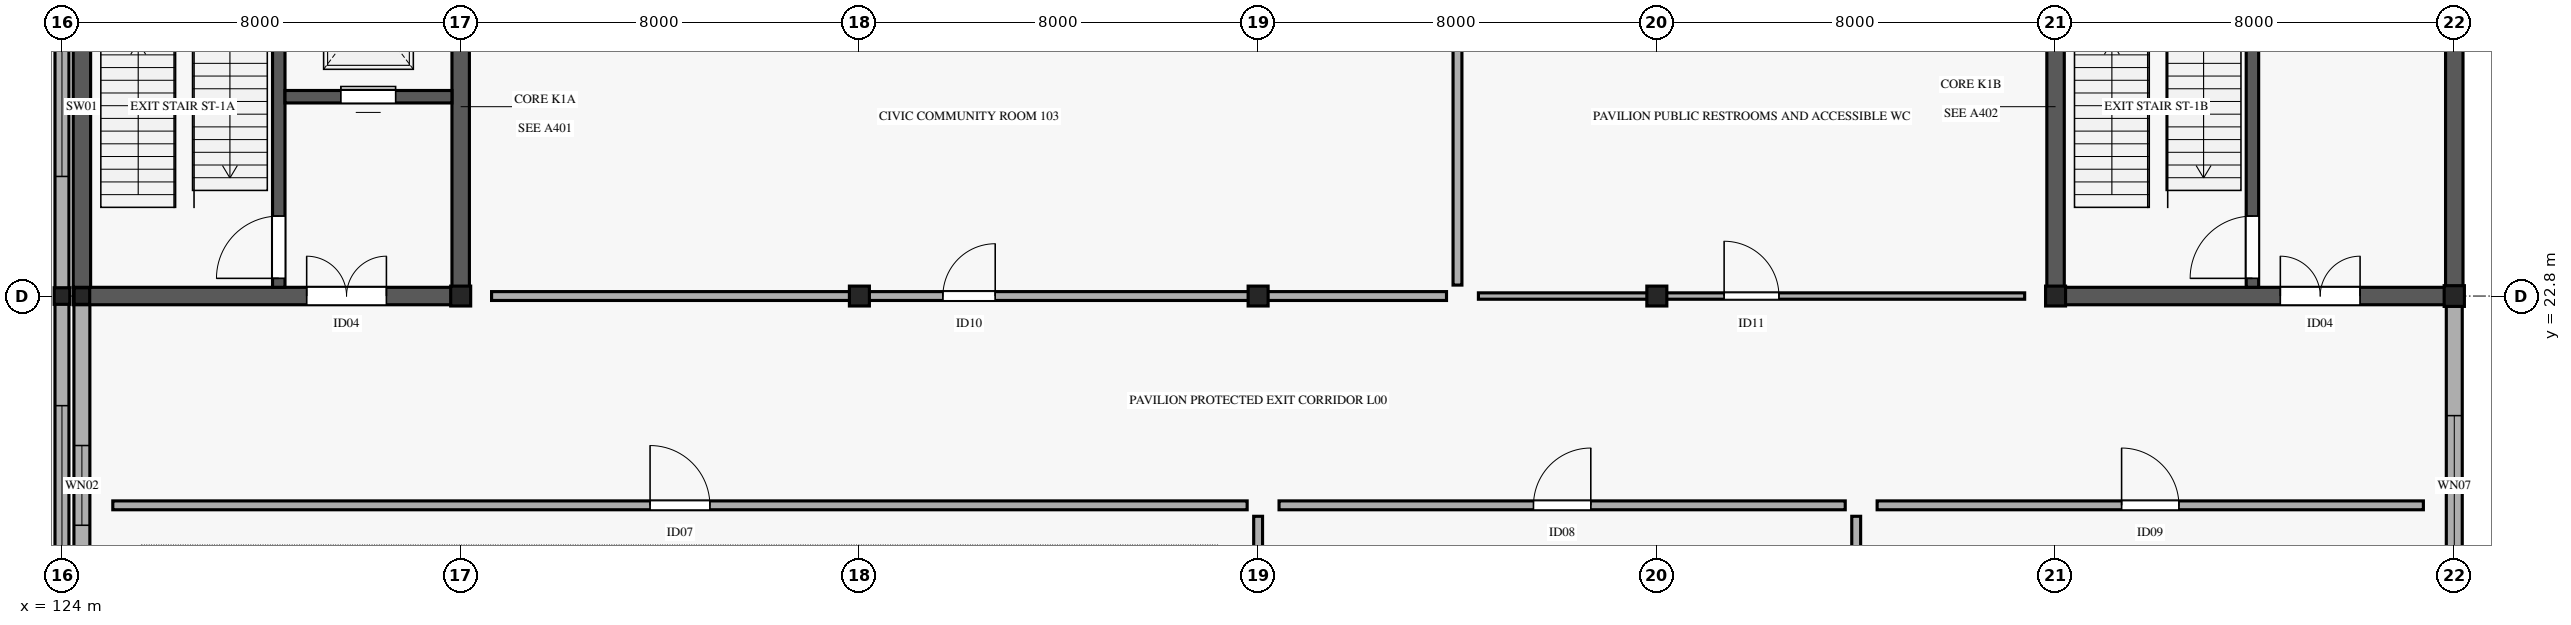
"""IFC4 building model, lengths in metres.
Left out: names, types, materials, properties, quantities, classifications, styles, units other than length and angle.
Written with IfcOpenShell. Run it as: python <this file> out.ifc"""

import sys

from ifc_helpers import new_model, si_unit, direction, frame, frame_2d, origin, origin_2d, place, context, subcontext, project, spatial, rectangle, i_section, extrude, element, fill, save


model = new_model("IFC4")
c1 = context("Model", 3, precision=1e-05, world=origin(), true_north=direction((0.0, 1.0)))
c2 = subcontext(c1, "Body", "Model", "MODEL_VIEW")
j1 = project(units=[si_unit("LENGTHUNIT", "METRE"), si_unit("PLANEANGLEUNIT", "RADIAN")], contexts=[c1])
p1 = place(None, origin())
s1 = spatial("IfcSite", under=j1, at=p1, CompositionType="ELEMENT")
p2 = place(p1, origin())
s2 = spatial("IfcBuilding", under=s1, at=p2, CompositionType="ELEMENT")
p3 = place(p2, origin())
s3 = spatial("IfcBuildingStorey", under=s2, at=p3, CompositionType="ELEMENT", Elevation=0.0)
p4 = place(p3, frame((124.4, 22.8, 0.0), z_axis=(0.0, 0.0, 1.0), x_axis=(1.0, 0.0, 0.0)))
e1 = element("IfcColumn", 1, at=p4, inside=s3, PredefinedType="COLUMN", context=c2, shape_type="SweptSolid", body=[
    extrude(i_section(OverallWidth=0.313, OverallDepth=0.333, WebThickness=0.018, FlangeThickness=0.028, FilletRadius=0.015, at=origin_2d()), origin(), (0.0, 0.0, 1.0), 5.185),
])
for number, where, z_axis, x_axis in (
    (2, (132.0, 22.8, 0.0), (0.0, 0.0, 1.0), (1.0, 0.0, 0.0)),
    (3, (140.0, 22.8, 0.0), (0.0, 0.0, 1.0), (1.0, 0.0, 0.0)),
    (4, (148.0, 22.8, 0.0), (0.0, 0.0, 1.0), (1.0, 0.0, 0.0)),
    (5, (156.0, 22.8, 0.0), (0.0, 0.0, 1.0), (1.0, 0.0, 0.0)),
    (6, (164.0, 22.8, 0.0), (0.0, 0.0, 1.0), (1.0, 0.0, 0.0)),
):
    element("IfcColumn", number, at=place(p3, frame(where, z_axis=z_axis, x_axis=x_axis)), inside=s3, PredefinedType="COLUMN", context=c2, shape_type="SweptSolid", body=[
        extrude(i_section(OverallWidth=0.401, OverallDepth=0.399, WebThickness=0.025, FlangeThickness=0.04, FilletRadius=0.015, at=origin_2d()), origin(), (0.0, 0.0, 1.0), 5.185),
    ])
p5 = place(p3, frame((172.0, 22.8, 0.0), z_axis=(0.0, 0.0, 1.0), x_axis=(1.0, 0.0, 0.0)))
e7 = element("IfcColumn", 7, at=p5, inside=s3, PredefinedType="COLUMN", context=c2, shape_type="SweptSolid", body=[
    extrude(i_section(OverallWidth=0.406, OverallDepth=0.416, WebThickness=0.03, FlangeThickness=0.048, FilletRadius=0.015, at=origin_2d()), origin(), (0.0, 0.0, 1.0), 5.185),
])
p6 = place(p3, frame((124.0, 22.8, 0.0), z_axis=(0.0, 0.0, 1.0), x_axis=(1.0, 0.0, 0.0)))
e8 = element("IfcColumn", 8, at=p6, inside=s3, PredefinedType="COLUMN", context=c2, shape_type="SweptSolid", body=[
    extrude(i_section(OverallWidth=0.313, OverallDepth=0.333, WebThickness=0.018, FlangeThickness=0.028, FilletRadius=0.015, at=origin_2d()), origin(), (0.0, 0.0, 1.0), 5.185),
])
p7 = place(p3, frame((124.4, 15.18, 0.0), z_axis=(0.0, 0.0, 1.0), x_axis=(0.0, 1.0, 0.0)))
e9 = element("IfcWall", 9, at=p7, inside=s3, PredefinedType="STANDARD", context=c2, shape_type="SweptSolid", body=[
    extrude(rectangle(XDim=7.64, YDim=0.32, at=frame_2d((3.82, 0.0))), origin(), (0.0, 0.0, 1.0), 4.25),
])
p8 = place(p7, frame((3.02, 0.0, 0.75)))
e10 = element("IfcOpeningElement", 10, at=p8, cuts=e9, PredefinedType="OPENING", context=c2, shape_type="SweptSolid", body=[
    extrude(rectangle(XDim=1.6, YDim=2.0, at=frame_2d((0.8, 1.0))), frame((0.0, 0.17, 0.0), z_axis=(0.0, -1.0, 0.0), x_axis=(1.0, 0.0, 0.0)), (0.0, 0.0, 1.0), 0.34),
])
p9 = place(p3, frame((172.0, 22.82, 0.0), z_axis=(0.0, 0.0, 1.0), x_axis=(0.0, -1.0, 0.0)))
e11 = element("IfcWall", 11, at=p9, inside=s3, PredefinedType="STANDARD", context=c2, shape_type="SweptSolid", body=[
    extrude(rectangle(XDim=7.64, YDim=0.32, at=frame_2d((3.82, 0.0))), origin(), (0.0, 0.0, 1.0), 4.25),
])
p10 = place(p9, frame((2.42, 0.0, 0.75)))
e12 = element("IfcOpeningElement", 12, at=p10, cuts=e11, PredefinedType="OPENING", context=c2, shape_type="SweptSolid", body=[
    extrude(rectangle(XDim=2.8, YDim=2.0, at=frame_2d((1.4, 1.0))), frame((0.0, 0.17, 0.0), z_axis=(0.0, -1.0, 0.0), x_axis=(1.0, 0.0, 0.0)), (0.0, 0.0, 1.0), 0.34),
])
p11 = place(p3, frame((124.0, 30.42, 0.0), z_axis=(0.0, 0.0, 1.0), x_axis=(0.0, -1.0, 0.0)))
e13 = element("IfcWall", 13, at=p11, inside=s3, PredefinedType="STANDARD", context=c2, shape_type="SweptSolid", body=[
    extrude(rectangle(XDim=7.64, YDim=0.28, at=frame_2d((3.82, 0.0))), origin(), (0.0, 0.0, 1.0), 4.25),
])
p12 = place(p11, frame((2.42, 0.0, 0.75)))
e14 = element("IfcOpeningElement", 14, at=p12, cuts=e13, PredefinedType="OPENING", context=c2, shape_type="SweptSolid", body=[
    extrude(rectangle(XDim=2.8, YDim=2.0, at=frame_2d((1.4, 1.0))), frame((0.0, 0.15, 0.0), z_axis=(0.0, -1.0, 0.0), x_axis=(1.0, 0.0, 0.0)), (0.0, 0.0, 1.0), 0.3),
])
p13 = place(p3, frame((124.0, 22.82, 0.0), z_axis=(0.0, 0.0, 1.0), x_axis=(0.0, -1.0, 0.0)))
e15 = element("IfcWall", 15, at=p13, inside=s3, PredefinedType="STANDARD", context=c2, shape_type="SweptSolid", body=[
    extrude(rectangle(XDim=7.64, YDim=0.28, at=frame_2d((3.82, 0.0))), origin(), (0.0, 0.0, 1.0), 4.25),
])
p14 = place(p13, frame((2.22, 0.0, 0.75)))
e16 = element("IfcOpeningElement", 16, at=p14, cuts=e15, PredefinedType="OPENING", context=c2, shape_type="SweptSolid", body=[
    extrude(rectangle(XDim=3.2, YDim=2.0, at=frame_2d((1.6, 1.0))), frame((0.0, 0.15, 0.0), z_axis=(0.0, -1.0, 0.0), x_axis=(1.0, 0.0, 0.0)), (0.0, 0.0, 1.0), 0.3),
])
p15 = place(p3, frame((124.225, 22.8, 0.0), z_axis=(0.0, 0.0, 1.0), x_axis=(1.0, 0.0, 0.0)))
e17 = element("IfcWall", 17, at=p15, inside=s3, PredefinedType="SHEAR", context=c2, shape_type="SweptSolid", body=[
    extrude(rectangle(XDim=7.95, YDim=0.35, at=frame_2d((3.975, 0.0))), origin(), (0.0, 0.0, 1.0), 5.19),
])
p16 = place(p15, frame((4.685, 0.0, 0.0)))
e18 = element("IfcOpeningElement", 18, at=p16, cuts=e17, PredefinedType="OPENING", context=c2, shape_type="SweptSolid", body=[
    extrude(rectangle(XDim=1.6, YDim=2.35, at=frame_2d((0.8, 1.175))), frame((0.0, 0.185, 0.0), z_axis=(0.0, -1.0, 0.0), x_axis=(1.0, 0.0, 0.0)), (0.0, 0.0, 1.0), 0.37),
])
for number, where, z_axis, x_axis in (
    (19, (124.4, 22.975, 0.0), (0.0, 0.0, 1.0), (0.0, 1.0, 0.0)),
    (20, (132.0, 22.975, 0.0), (0.0, 0.0, 1.0), (0.0, 1.0, 0.0)),
):
    element("IfcWall", number, at=place(p3, frame(where, z_axis=z_axis, x_axis=x_axis)), inside=s3, PredefinedType="SHEAR", context=c2, shape_type="SweptSolid", body=[
        extrude(rectangle(XDim=7.25, YDim=0.35, at=frame_2d((3.625, 0.0))), origin(), (0.0, 0.0, 1.0), 5.19),
    ])
p17 = place(p3, frame((128.35, 22.975, 0.0), z_axis=(0.0, 0.0, 1.0), x_axis=(0.0, 1.0, 0.0)))
e21 = element("IfcWall", 21, at=p17, inside=s3, PredefinedType="SHEAR", context=c2, shape_type="SweptSolid", body=[
    extrude(rectangle(XDim=7.25, YDim=0.25, at=frame_2d((3.625, 0.0))), origin(), (0.0, 0.0, 1.0), 5.19),
])
p18 = place(p17, frame((0.18, 0.0, 0.0)))
e22 = element("IfcOpeningElement", 22, at=p18, cuts=e21, PredefinedType="OPENING", context=c2, shape_type="SweptSolid", body=[
    extrude(rectangle(XDim=1.25, YDim=2.2, at=frame_2d((0.625, 1.1))), frame((0.0, 0.135, 0.0), z_axis=(0.0, -1.0, 0.0), x_axis=(1.0, 0.0, 0.0)), (0.0, 0.0, 1.0), 0.27),
])
p19 = place(p3, frame((128.475, 26.8, 0.0), z_axis=(0.0, 0.0, 1.0), x_axis=(1.0, 0.0, 0.0)))
e23 = element("IfcWall", 23, at=p19, inside=s3, PredefinedType="SHEAR", context=c2, shape_type="SweptSolid", body=[
    extrude(rectangle(XDim=3.35, YDim=0.25, at=frame_2d((1.675, 0.0))), origin(), (0.0, 0.0, 1.0), 5.19),
])
p20 = place(p19, frame((1.12, 0.0, 0.0)))
e24 = element("IfcOpeningElement", 24, at=p20, cuts=e23, PredefinedType="OPENING", context=c2, shape_type="SweptSolid", body=[
    extrude(rectangle(XDim=1.1, YDim=2.2, at=frame_2d((0.55, 1.1))), frame((0.0, 0.135, 0.0), z_axis=(0.0, -1.0, 0.0), x_axis=(1.0, 0.0, 0.0)), (0.0, 0.0, 1.0), 0.27),
])
p21 = place(p3, frame((163.825, 22.8, 0.0), z_axis=(0.0, 0.0, 1.0), x_axis=(1.0, 0.0, 0.0)))
e25 = element("IfcWall", 25, at=p21, inside=s3, PredefinedType="SHEAR", context=c2, shape_type="SweptSolid", body=[
    extrude(rectangle(XDim=8.35, YDim=0.35, at=frame_2d((4.175, 0.0))), origin(), (0.0, 0.0, 1.0), 5.19),
])
p22 = place(p21, frame((4.685, 0.0, 0.0)))
e26 = element("IfcOpeningElement", 26, at=p22, cuts=e25, PredefinedType="OPENING", context=c2, shape_type="SweptSolid", body=[
    extrude(rectangle(XDim=1.6, YDim=2.35, at=frame_2d((0.8, 1.175))), frame((0.0, 0.185, 0.0), z_axis=(0.0, -1.0, 0.0), x_axis=(1.0, 0.0, 0.0)), (0.0, 0.0, 1.0), 0.37),
])
for number, where, z_axis, x_axis in (
    (27, (164.0, 22.975, 0.0), (0.0, 0.0, 1.0), (0.0, 1.0, 0.0)),
    (28, (172.0, 22.975, 0.0), (0.0, 0.0, 1.0), (0.0, 1.0, 0.0)),
):
    element("IfcWall", number, at=place(p3, frame(where, z_axis=z_axis, x_axis=x_axis)), inside=s3, PredefinedType="SHEAR", context=c2, shape_type="SweptSolid", body=[
        extrude(rectangle(XDim=7.25, YDim=0.35, at=frame_2d((3.625, 0.0))), origin(), (0.0, 0.0, 1.0), 5.19),
    ])
p23 = place(p3, frame((167.95, 22.975, 0.0), z_axis=(0.0, 0.0, 1.0), x_axis=(0.0, 1.0, 0.0)))
e29 = element("IfcWall", 29, at=p23, inside=s3, PredefinedType="SHEAR", context=c2, shape_type="SweptSolid", body=[
    extrude(rectangle(XDim=7.25, YDim=0.25, at=frame_2d((3.625, 0.0))), origin(), (0.0, 0.0, 1.0), 5.19),
])
p24 = place(p23, frame((0.18, 0.0, 0.0)))
e30 = element("IfcOpeningElement", 30, at=p24, cuts=e29, PredefinedType="OPENING", context=c2, shape_type="SweptSolid", body=[
    extrude(rectangle(XDim=1.25, YDim=2.2, at=frame_2d((0.625, 1.1))), frame((0.0, 0.135, 0.0), z_axis=(0.0, -1.0, 0.0), x_axis=(1.0, 0.0, 0.0)), (0.0, 0.0, 1.0), 0.27),
])
p25 = place(p3, frame((125.02, 18.6, 0.0), z_axis=(0.0, 0.0, 1.0), x_axis=(1.0, 0.0, 0.0)))
e31 = element("IfcWall", 31, at=p25, inside=s3, PredefinedType="PARTITIONING", context=c2, shape_type="SweptSolid", body=[
    extrude(rectangle(XDim=22.76, YDim=0.178, at=frame_2d((11.38, 0.0))), origin(), (0.0, 0.0, 1.0), 4.05),
])
p26 = place(p25, frame((10.78, 0.0, 0.0)))
e32 = element("IfcOpeningElement", 32, at=p26, cuts=e31, PredefinedType="OPENING", context=c2, shape_type="SweptSolid", body=[
    extrude(rectangle(XDim=1.2, YDim=2.2, at=frame_2d((0.6, 1.1))), frame((0.0, 0.099, 0.0), z_axis=(0.0, -1.0, 0.0), x_axis=(1.0, 0.0, 0.0)), (0.0, 0.0, 1.0), 0.198),
])
p27 = place(p3, frame((148.0, 4.42, 0.0), z_axis=(0.0, 0.0, 1.0), x_axis=(0.0, 1.0, 0.0)))
e33 = element("IfcWall", 33, at=p27, inside=s3, PredefinedType="PARTITIONING", context=c2, shape_type="SweptSolid", body=[
    extrude(rectangle(XDim=13.96, YDim=0.178, at=frame_2d((6.98, 0.0))), origin(), (0.0, 0.0, 1.0), 4.05),
])
p28 = place(p3, frame((148.42, 18.6, 0.0), z_axis=(0.0, 0.0, 1.0), x_axis=(1.0, 0.0, 0.0)))
e34 = element("IfcWall", 34, at=p28, inside=s3, PredefinedType="PARTITIONING", context=c2, shape_type="SweptSolid", body=[
    extrude(rectangle(XDim=11.36, YDim=0.178, at=frame_2d((5.68, 0.0))), origin(), (0.0, 0.0, 1.0), 4.05),
])
p29 = place(p28, frame((5.105, 0.0, 0.0)))
e35 = element("IfcOpeningElement", 35, at=p29, cuts=e34, PredefinedType="OPENING", context=c2, shape_type="SweptSolid", body=[
    extrude(rectangle(XDim=1.15, YDim=2.2, at=frame_2d((0.575, 1.1))), frame((0.0, 0.099, 0.0), z_axis=(0.0, -1.0, 0.0), x_axis=(1.0, 0.0, 0.0)), (0.0, 0.0, 1.0), 0.198),
])
p30 = place(p3, frame((160.0, 4.42, 0.0), z_axis=(0.0, 0.0, 1.0), x_axis=(0.0, 1.0, 0.0)))
e36 = element("IfcWall", 36, at=p30, inside=s3, PredefinedType="PARTITIONING", context=c2, shape_type="SweptSolid", body=[
    extrude(rectangle(XDim=13.96, YDim=0.178, at=frame_2d((6.98, 0.0))), origin(), (0.0, 0.0, 1.0), 4.05),
])
p31 = place(p3, frame((160.42, 18.6, 0.0), z_axis=(0.0, 0.0, 1.0), x_axis=(1.0, 0.0, 0.0)))
e37 = element("IfcWall", 37, at=p31, inside=s3, PredefinedType="PARTITIONING", context=c2, shape_type="SweptSolid", body=[
    extrude(rectangle(XDim=10.96, YDim=0.178, at=frame_2d((5.48, 0.0))), origin(), (0.0, 0.0, 1.0), 4.05),
])
p32 = place(p31, frame((4.905, 0.0, 0.0)))
e38 = element("IfcOpeningElement", 38, at=p32, cuts=e37, PredefinedType="OPENING", context=c2, shape_type="SweptSolid", body=[
    extrude(rectangle(XDim=1.15, YDim=2.15, at=frame_2d((0.575, 1.075))), frame((0.0, 0.099, 0.0), z_axis=(0.0, -1.0, 0.0), x_axis=(1.0, 0.0, 0.0)), (0.0, 0.0, 1.0), 0.198),
])
p33 = place(p3, frame((132.62, 22.8, 0.0), z_axis=(0.0, 0.0, 1.0), x_axis=(1.0, 0.0, 0.0)))
e39 = element("IfcWall", 39, at=p33, inside=s3, PredefinedType="PARTITIONING", context=c2, shape_type="SweptSolid", body=[
    extrude(rectangle(XDim=19.16, YDim=0.178, at=frame_2d((9.58, 0.0))), origin(), (0.0, 0.0, 1.0), 4.05),
])
p34 = place(p33, frame((9.055, 0.0, 0.0)))
e40 = element("IfcOpeningElement", 40, at=p34, cuts=e39, PredefinedType="OPENING", context=c2, shape_type="SweptSolid", body=[
    extrude(rectangle(XDim=1.05, YDim=2.15, at=frame_2d((0.525, 1.075))), frame((0.0, 0.099, 0.0), z_axis=(0.0, -1.0, 0.0), x_axis=(1.0, 0.0, 0.0)), (0.0, 0.0, 1.0), 0.198),
])
p35 = place(p3, frame((152.0, 23.02, 0.0), z_axis=(0.0, 0.0, 1.0), x_axis=(0.0, 1.0, 0.0)))
e41 = element("IfcWall", 41, at=p35, inside=s3, PredefinedType="PARTITIONING", context=c2, shape_type="SweptSolid", body=[
    extrude(rectangle(XDim=6.76, YDim=0.178, at=frame_2d((3.38, 0.0))), origin(), (0.0, 0.0, 1.0), 4.05),
])
p36 = place(p3, frame((152.42, 22.8, 0.0), z_axis=(0.0, 0.0, 1.0), x_axis=(1.0, 0.0, 0.0)))
e42 = element("IfcWall", 42, at=p36, inside=s3, PredefinedType="PARTITIONING", context=c2, shape_type="SweptSolid", body=[
    extrude(rectangle(XDim=10.96, YDim=0.128, at=frame_2d((5.48, 0.0))), origin(), (0.0, 0.0, 1.0), 4.05),
])
p37 = place(p36, frame((4.93, 0.0, 0.0)))
e43 = element("IfcOpeningElement", 43, at=p37, cuts=e42, PredefinedType="OPENING", context=c2, shape_type="SweptSolid", body=[
    extrude(rectangle(XDim=1.1, YDim=2.3, at=frame_2d((0.55, 1.15))), frame((0.0, 0.074, 0.0), z_axis=(0.0, -1.0, 0.0), x_axis=(1.0, 0.0, 0.0)), (0.0, 0.0, 1.0), 0.148),
])
p38 = place(p8, origin())
e44 = element("IfcWindow", 44, at=p38, inside=s3, PartitioningType="SINGLE_PANEL", PredefinedType="WINDOW", context=c2, shape_type="SweptSolid", body=[
    extrude(rectangle(XDim=1.6, YDim=2.0, at=frame_2d((0.8, 1.0))), frame((0.0, 0.03, 0.0), z_axis=(0.0, -1.0, 0.0), x_axis=(1.0, 0.0, 0.0)), (0.0, 0.0, 1.0), 0.06),
])
fill(e10, e44)
p39 = place(p10, origin())
e45 = element("IfcWindow", 45, at=p39, inside=s3, PartitioningType="SINGLE_PANEL", PredefinedType="WINDOW", context=c2, shape_type="SweptSolid", body=[
    extrude(rectangle(XDim=2.8, YDim=2.0, at=frame_2d((1.4, 1.0))), frame((0.0, 0.03, 0.0), z_axis=(0.0, -1.0, 0.0), x_axis=(1.0, 0.0, 0.0)), (0.0, 0.0, 1.0), 0.06),
])
fill(e12, e45)
p40 = place(p12, origin())
e46 = element("IfcWindow", 46, at=p40, inside=s3, PartitioningType="SINGLE_PANEL", PredefinedType="WINDOW", context=c2, shape_type="SweptSolid", body=[
    extrude(rectangle(XDim=2.8, YDim=2.0, at=frame_2d((1.4, 1.0))), frame((0.0, 0.03, 0.0), z_axis=(0.0, -1.0, 0.0), x_axis=(1.0, 0.0, 0.0)), (0.0, 0.0, 1.0), 0.06),
])
fill(e14, e46)
p41 = place(p14, origin())
e47 = element("IfcWindow", 47, at=p41, inside=s3, PartitioningType="SINGLE_PANEL", PredefinedType="WINDOW", context=c2, shape_type="SweptSolid", body=[
    extrude(rectangle(XDim=3.2, YDim=2.0, at=frame_2d((1.6, 1.0))), frame((0.0, 0.03, 0.0), z_axis=(0.0, -1.0, 0.0), x_axis=(1.0, 0.0, 0.0)), (0.0, 0.0, 1.0), 0.06),
])
fill(e16, e47)
p42 = place(p18, origin())
e48 = element("IfcDoor", 48, at=p42, inside=s3, OperationType="SINGLE_SWING_LEFT", PredefinedType="DOOR", context=c2, shape_type="SweptSolid", body=[
    extrude(rectangle(XDim=1.25, YDim=2.2, at=frame_2d((0.625, 1.1))), frame((0.0, 0.025, 0.0), z_axis=(0.0, -1.0, 0.0), x_axis=(1.0, 0.0, 0.0)), (0.0, 0.0, 1.0), 0.05),
])
fill(e22, e48)
p43 = place(p16, origin())
e49 = element("IfcDoor", 49, at=p43, inside=s3, OperationType="DOUBLE_DOOR_SINGLE_SWING", PredefinedType="DOOR", context=c2, shape_type="SweptSolid", body=[
    extrude(rectangle(XDim=1.6, YDim=2.35, at=frame_2d((0.8, 1.175))), frame((0.0, 0.025, 0.0), z_axis=(0.0, -1.0, 0.0), x_axis=(1.0, 0.0, 0.0)), (0.0, 0.0, 1.0), 0.05),
])
fill(e18, e49)
p44 = place(p20, origin())
e50 = element("IfcDoor", 50, at=p44, inside=s3, OperationType="SLIDING_TO_LEFT", PredefinedType="DOOR", context=c2, shape_type="SweptSolid", body=[
    extrude(rectangle(XDim=1.1, YDim=2.2, at=frame_2d((0.55, 1.1))), frame((0.0, 0.025, 0.0), z_axis=(0.0, -1.0, 0.0), x_axis=(1.0, 0.0, 0.0)), (0.0, 0.0, 1.0), 0.05),
])
fill(e24, e50)
p45 = place(p24, origin())
e51 = element("IfcDoor", 51, at=p45, inside=s3, OperationType="SINGLE_SWING_LEFT", PredefinedType="DOOR", context=c2, shape_type="SweptSolid", body=[
    extrude(rectangle(XDim=1.25, YDim=2.2, at=frame_2d((0.625, 1.1))), frame((0.0, 0.025, 0.0), z_axis=(0.0, -1.0, 0.0), x_axis=(1.0, 0.0, 0.0)), (0.0, 0.0, 1.0), 0.05),
])
fill(e30, e51)
p46 = place(p22, origin())
e52 = element("IfcDoor", 52, at=p46, inside=s3, OperationType="DOUBLE_DOOR_SINGLE_SWING", PredefinedType="DOOR", context=c2, shape_type="SweptSolid", body=[
    extrude(rectangle(XDim=1.6, YDim=2.35, at=frame_2d((0.8, 1.175))), frame((0.0, 0.025, 0.0), z_axis=(0.0, -1.0, 0.0), x_axis=(1.0, 0.0, 0.0)), (0.0, 0.0, 1.0), 0.05),
])
fill(e26, e52)
p47 = place(p26, origin())
e53 = element("IfcDoor", 53, at=p47, inside=s3, OperationType="SINGLE_SWING_LEFT", PredefinedType="DOOR", context=c2, shape_type="SweptSolid", body=[
    extrude(rectangle(XDim=1.2, YDim=2.2, at=frame_2d((0.6, 1.1))), frame((0.0, 0.025, 0.0), z_axis=(0.0, -1.0, 0.0), x_axis=(1.0, 0.0, 0.0)), (0.0, 0.0, 1.0), 0.05),
])
fill(e32, e53)
p48 = place(p29, origin())
e54 = element("IfcDoor", 54, at=p48, inside=s3, OperationType="SINGLE_SWING_RIGHT", PredefinedType="DOOR", context=c2, shape_type="SweptSolid", body=[
    extrude(rectangle(XDim=1.15, YDim=2.2, at=frame_2d((0.575, 1.1))), frame((0.0, 0.025, 0.0), z_axis=(0.0, -1.0, 0.0), x_axis=(1.0, 0.0, 0.0)), (0.0, 0.0, 1.0), 0.05),
])
fill(e35, e54)
p49 = place(p32, origin())
e55 = element("IfcDoor", 55, at=p49, inside=s3, OperationType="SINGLE_SWING_LEFT", PredefinedType="DOOR", context=c2, shape_type="SweptSolid", body=[
    extrude(rectangle(XDim=1.15, YDim=2.15, at=frame_2d((0.575, 1.075))), frame((0.0, 0.025, 0.0), z_axis=(0.0, -1.0, 0.0), x_axis=(1.0, 0.0, 0.0)), (0.0, 0.0, 1.0), 0.05),
])
fill(e38, e55)
p50 = place(p34, origin())
e56 = element("IfcDoor", 56, at=p50, inside=s3, OperationType="SINGLE_SWING_RIGHT", PredefinedType="DOOR", context=c2, shape_type="SweptSolid", body=[
    extrude(rectangle(XDim=1.05, YDim=2.15, at=frame_2d((0.525, 1.075))), frame((0.0, 0.025, 0.0), z_axis=(0.0, -1.0, 0.0), x_axis=(1.0, 0.0, 0.0)), (0.0, 0.0, 1.0), 0.05),
])
fill(e40, e56)
p51 = place(p37, origin())
e57 = element("IfcDoor", 57, at=p51, inside=s3, OperationType="SINGLE_SWING_LEFT", PredefinedType="DOOR", context=c2, shape_type="SweptSolid", body=[
    extrude(rectangle(XDim=1.1, YDim=2.3, at=frame_2d((0.55, 1.15))), frame((0.0, 0.025, 0.0), z_axis=(0.0, -1.0, 0.0), x_axis=(1.0, 0.0, 0.0)), (0.0, 0.0, 1.0), 0.05),
])
fill(e43, e57)
save(model, sys.argv[1])
